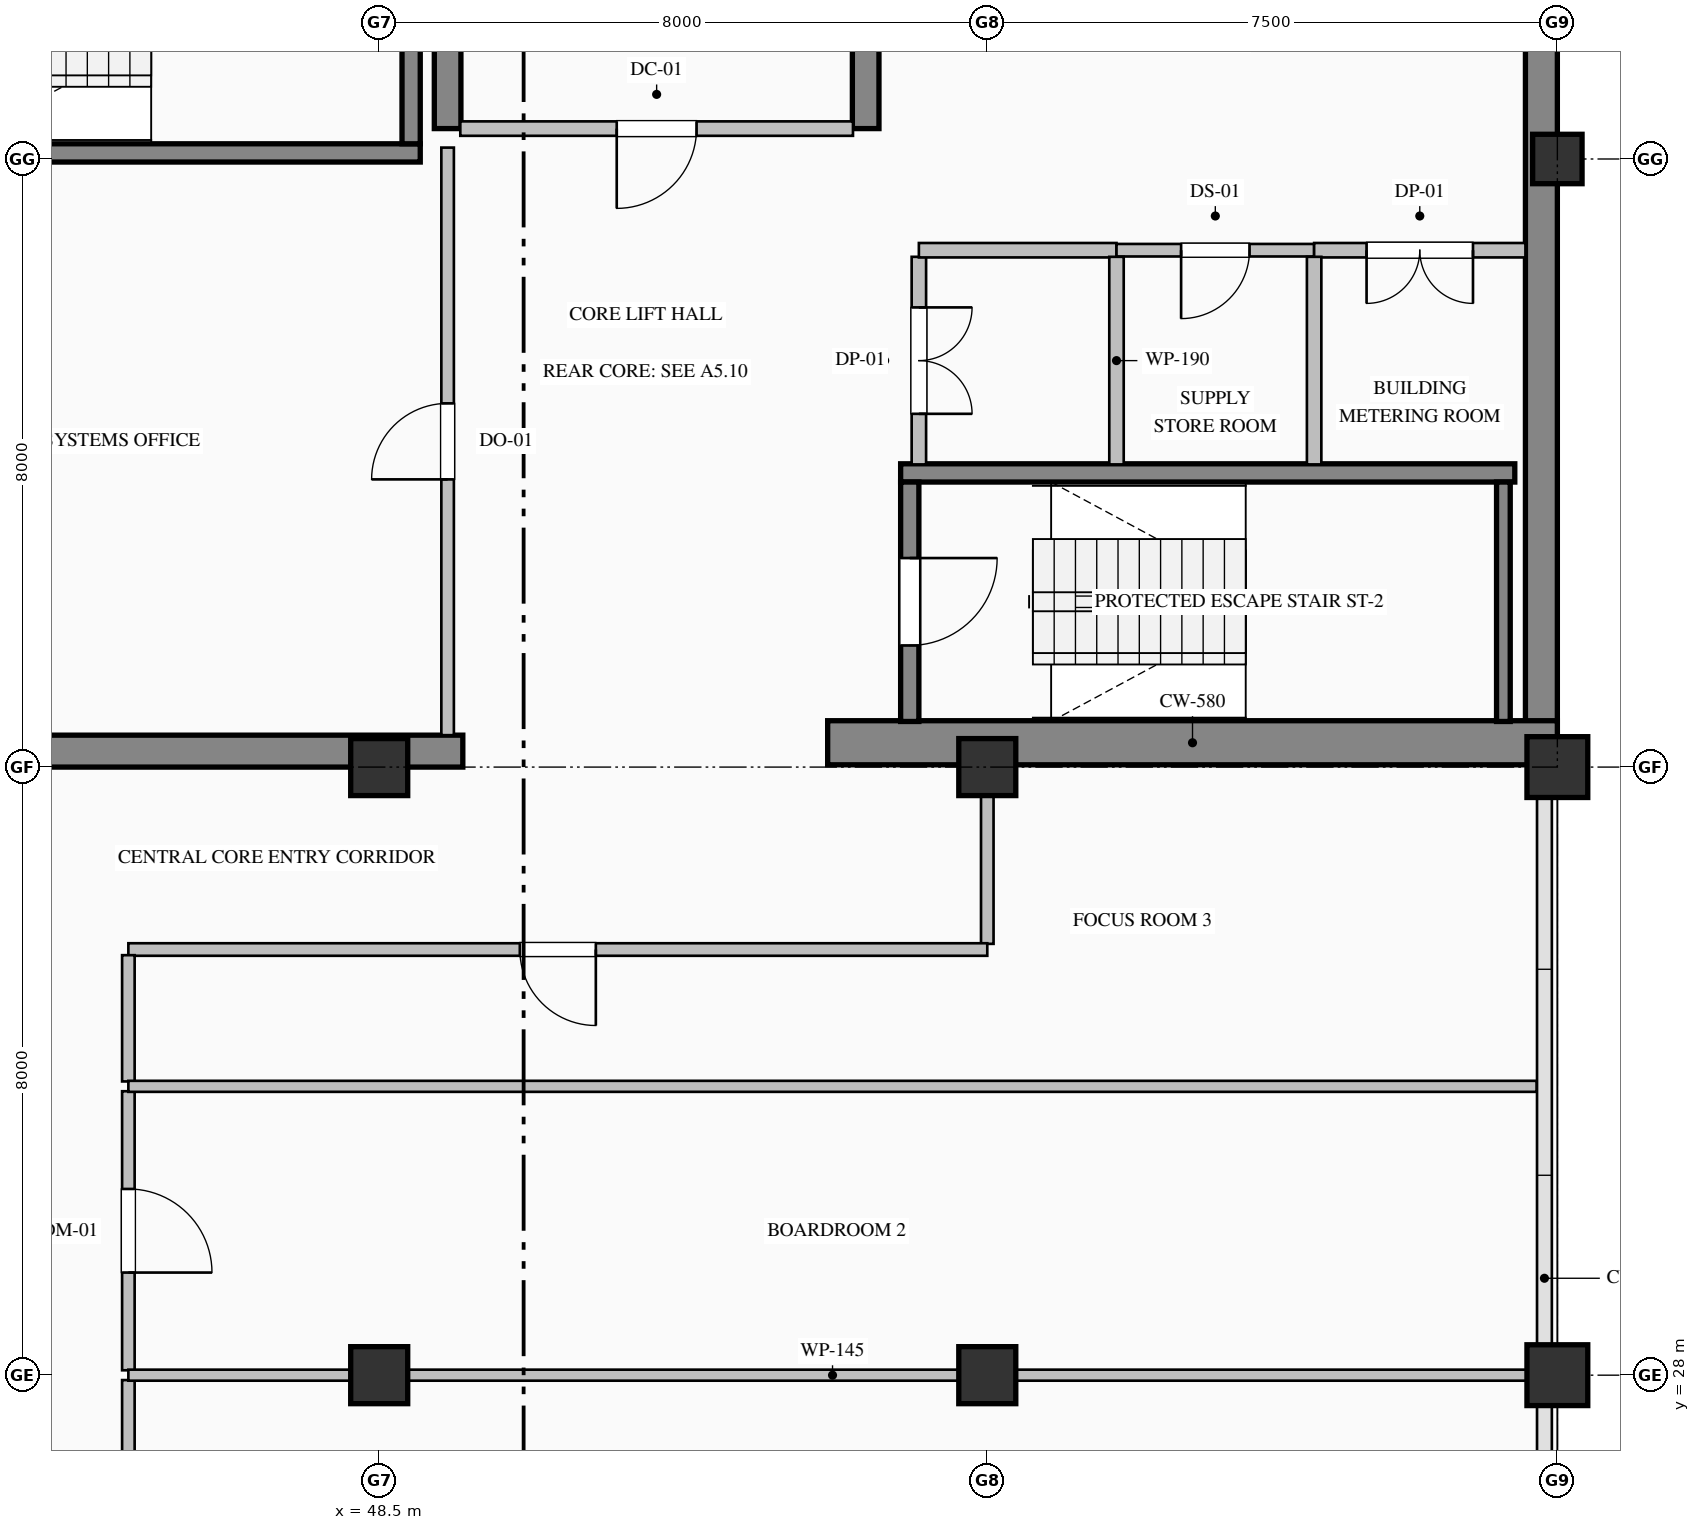
"""IFC4 building model, lengths in metres.
Left out: names, types, materials, properties, quantities, classifications, styles, units other than length and angle.
Written with IfcOpenShell. Run it as: python <this file> out.ifc"""

import sys

from ifc_helpers import new_model, si_unit, direction, frame, frame_2d, origin, origin_2d, place, context, subcontext, project, spatial, rectangle, hollow_rectangle, extrude, element, fill, save


model = new_model("IFC4")
c1 = context("Model", 3, precision=1e-05, world=origin(), true_north=direction((0.0, 1.0)))
c2 = subcontext(c1, "Body", "Model", "MODEL_VIEW")
j1 = project(units=[si_unit("LENGTHUNIT", "METRE"), si_unit("PLANEANGLEUNIT", "RADIAN")], contexts=[c1])
p1 = place(None, origin())
s1 = spatial("IfcSite", under=j1, at=p1, CompositionType="ELEMENT")
p2 = place(p1, origin())
s2 = spatial("IfcBuilding", under=s1, at=p2, CompositionType="ELEMENT")
p3 = place(p2, frame((0.0, 0.0, 291.2)))
s3 = spatial("IfcBuildingStorey", under=s2, at=p3, CompositionType="ELEMENT", Elevation=291.2)
p4 = place(p3, frame((63.79, 36.32, 0.0), z_axis=(0.0, 0.0, 1.0), x_axis=(0.0, 1.0, 0.0)))
e1 = element("IfcWall", 1, at=p4, inside=s3, PredefinedType="SHEAR", context=c2, shape_type="SweptSolid", body=[
    extrude(rectangle(XDim=15.26, YDim=0.42, at=frame_2d((7.63, 0.0))), origin(), (0.0, 0.0, 1.0), 3.785),
])
p5 = place(p3, frame((40.5, 36.21, 0.0), z_axis=(0.0, 0.0, 1.0), x_axis=(1.0, 0.0, 0.0)))
e2 = element("IfcWall", 2, at=p5, inside=s3, PredefinedType="SHEAR", context=c2, shape_type="SweptSolid", body=[
    extrude(rectangle(XDim=9.1, YDim=0.42, at=frame_2d((4.55, 0.0))), origin(), (0.0, 0.0, 1.0), 3.785),
])
p6 = place(p3, frame((54.4, 36.32, 0.0), z_axis=(0.0, 0.0, 1.0), x_axis=(1.0, 0.0, 0.0)))
e3 = element("IfcWall", 3, at=p6, inside=s3, PredefinedType="SHEAR", context=c2, shape_type="SweptSolid", body=[
    extrude(rectangle(XDim=9.6, YDim=0.58, at=frame_2d((4.8, 0.0))), origin(), (0.0, 0.0, 1.0), 4.0),
])
p7 = place(p3, frame((49.4, 44.4, 0.0), z_axis=(0.0, 0.0, 1.0), x_axis=(0.0, 1.0, 0.0)))
e4 = element("IfcWall", 4, at=p7, inside=s3, PredefinedType="SHEAR", context=c2, shape_type="SweptSolid", body=[
    extrude(rectangle(XDim=3.0, YDim=0.35, at=frame_2d((1.5, 0.0))), origin(), (0.0, 0.0, 1.0), 3.785),
])
p8 = place(p3, frame((54.9, 44.4, 0.0), z_axis=(0.0, 0.0, 1.0), x_axis=(0.0, 1.0, 0.0)))
e5 = element("IfcWall", 5, at=p8, inside=s3, PredefinedType="SHEAR", context=c2, shape_type="SweptSolid", body=[
    extrude(rectangle(XDim=7.18, YDim=0.35, at=frame_2d((3.59, 0.0))), origin(), (0.0, 0.0, 1.0), 3.785),
])
for number, where, z_axis, x_axis in (
    (6, (48.5, 28.0, 0.0), (0.0, 0.0, 1.0), (1.0, 0.0, 0.0)),
    (7, (48.5, 36.0, 0.0), (0.0, 0.0, 1.0), (1.0, 0.0, 0.0)),
    (8, (56.5, 28.0, 0.0), (0.0, 0.0, 1.0), (1.0, 0.0, 0.0)),
    (9, (56.5, 36.0, 0.0), (0.0, 0.0, 1.0), (1.0, 0.0, 0.0)),
):
    element("IfcColumn", number, at=place(p3, frame(where, z_axis=z_axis, x_axis=x_axis)), inside=s3, PredefinedType="COLUMN", context=c2, shape_type="SweptSolid", body=[
        extrude(rectangle(XDim=0.75, YDim=0.75, at=origin_2d()), origin(), (0.0, 0.0, 1.0), 4.0),
    ])
for number, where, z_axis, x_axis in (
    (10, (64.0, 28.0, 0.0), (0.0, 0.0, 1.0), (1.0, 0.0, 0.0)),
    (11, (64.0, 36.0, 0.0), (0.0, 0.0, 1.0), (1.0, 0.0, 0.0)),
):
    element("IfcColumn", number, at=place(p3, frame(where, z_axis=z_axis, x_axis=x_axis)), inside=s3, PredefinedType="COLUMN", context=c2, shape_type="SweptSolid", body=[
        extrude(hollow_rectangle(XDim=0.8, YDim=0.8, WallThickness=0.032, at=origin_2d()), origin(), (0.0, 0.0, 1.0), 4.0),
    ])
p9 = place(p3, frame((64.0, 44.0, 0.0), z_axis=(0.0, 0.0, 1.0), x_axis=(1.0, 0.0, 0.0)))
e12 = element("IfcColumn", 12, at=p9, inside=s3, PredefinedType="COLUMN", context=c2, shape_type="SweptSolid", body=[
    extrude(hollow_rectangle(XDim=0.65, YDim=0.65, WallThickness=0.028, at=origin_2d()), origin(), (0.0, 0.0, 1.0), 4.0),
])
p10 = place(p3, frame((49.04, 44.08, 0.0), z_axis=(0.0, 0.0, 1.0), x_axis=(-1.0, 0.0, 0.0)))
e13 = element("IfcWall", 13, at=p10, inside=s3, PredefinedType="SOLIDWALL", context=c2, shape_type="SweptSolid", body=[
    extrude(rectangle(XDim=8.08, YDim=0.24, at=frame_2d((4.04, 0.0))), origin(), (0.0, 0.0, 1.0), 4.0),
])
p11 = place(p3, frame((48.92, 44.2, 0.0), z_axis=(0.0, 0.0, 1.0), x_axis=(0.0, 1.0, 0.0)))
e14 = element("IfcWall", 14, at=p11, inside=s3, PredefinedType="SOLIDWALL", context=c2, shape_type="SweptSolid", body=[
    extrude(rectangle(XDim=3.15, YDim=0.24, at=frame_2d((1.575, 0.0))), origin(), (0.0, 0.0, 1.0), 4.0),
])
p12 = place(p3, frame((55.36, 39.87, 0.0), z_axis=(0.0, 0.0, 1.0), x_axis=(1.0, 0.0, 0.0)))
e15 = element("IfcWall", 15, at=p12, inside=s3, PredefinedType="SOLIDWALL", context=c2, shape_type="SweptSolid", body=[
    extrude(rectangle(XDim=8.08, YDim=0.24, at=frame_2d((4.04, 0.0))), origin(), (0.0, 0.0, 1.0), 4.0),
])
p13 = place(p3, frame((55.48, 39.75, 0.0), z_axis=(0.0, 0.0, 1.0), x_axis=(0.0, -1.0, 0.0)))
e16 = element("IfcWall", 16, at=p13, inside=s3, PredefinedType="SOLIDWALL", context=c2, shape_type="SweptSolid", body=[
    extrude(rectangle(XDim=3.15, YDim=0.24, at=frame_2d((1.575, 0.0))), origin(), (0.0, 0.0, 1.0), 4.0),
])
p14 = place(p13, frame((1.0, 0.0, 0.0)))
e17 = element("IfcOpeningElement", 17, at=p14, cuts=e16, PredefinedType="OPENING", context=c2, shape_type="SweptSolid", body=[
    extrude(rectangle(XDim=1.15, YDim=2.2, at=frame_2d((0.575, 1.1))), frame((0.0, 0.13, 0.0), z_axis=(0.0, -1.0, 0.0), x_axis=(1.0, 0.0, 0.0)), (0.0, 0.0, 1.0), 0.26),
])
p15 = place(p3, frame((63.29, 36.6, 0.0), z_axis=(0.0, 0.0, 1.0), x_axis=(0.0, 1.0, 0.0)))
e18 = element("IfcWall", 18, at=p15, inside=s3, PredefinedType="SOLIDWALL", context=c2, shape_type="SweptSolid", body=[
    extrude(rectangle(XDim=3.15, YDim=0.18, at=frame_2d((1.575, 0.0))), origin(), (0.0, 0.0, 1.0), 4.0),
])
p16 = place(p3, frame((54.733, 44.4, 0.0), z_axis=(0.0, 0.0, 1.0), x_axis=(-1.0, 0.0, 0.0)))
e19 = element("IfcWall", 19, at=p16, inside=s3, PredefinedType="PARTITIONING", context=c2, shape_type="SweptSolid", body=[
    extrude(rectangle(XDim=5.166, YDim=0.19, at=frame_2d((2.583, 0.0))), origin(), (0.0, 0.0, 1.0), 3.785),
])
p17 = place(p16, frame((2.058, 0.0, 0.0)))
e20 = element("IfcOpeningElement", 20, at=p17, cuts=e19, PredefinedType="OPENING", context=c2, shape_type="SweptSolid", body=[
    extrude(rectangle(XDim=1.05, YDim=2.15, at=frame_2d((0.525, 1.075))), frame((0.0, 0.105, 0.0), z_axis=(0.0, -1.0, 0.0), x_axis=(1.0, 0.0, 0.0)), (0.0, 0.0, 1.0), 0.21),
])
p18 = place(p3, frame((49.4, 36.42, 0.0), z_axis=(0.0, 0.0, 1.0), x_axis=(0.0, 1.0, 0.0)))
e21 = element("IfcWall", 21, at=p18, inside=s3, PredefinedType="PARTITIONING", context=c2, shape_type="SweptSolid", body=[
    extrude(rectangle(XDim=7.73, YDim=0.165, at=frame_2d((3.865, 0.0))), origin(), (0.0, 0.0, 1.0), 3.027),
])
p19 = place(p18, frame((3.365, 0.0, 0.0)))
e22 = element("IfcOpeningElement", 22, at=p19, cuts=e21, PredefinedType="OPENING", context=c2, shape_type="SweptSolid", body=[
    extrude(rectangle(XDim=1.0, YDim=2.15, at=frame_2d((0.5, 1.075))), frame((0.0, 0.093, 0.0), z_axis=(0.0, -1.0, 0.0), x_axis=(1.0, 0.0, 0.0)), (0.0, 0.0, 1.0), 0.185),
])
p20 = place(p3, frame((55.6, 42.713, 0.0), z_axis=(0.0, 0.0, 1.0), x_axis=(0.0, -1.0, 0.0)))
e23 = element("IfcWall", 23, at=p20, inside=s3, PredefinedType="PARTITIONING", context=c2, shape_type="SweptSolid", body=[
    extrude(rectangle(XDim=2.731, YDim=0.19, at=frame_2d((1.365, 0.0))), origin(), (0.0, 0.0, 1.0), 3.785),
])
p21 = place(p20, frame((0.666, 0.0, 0.0)))
e24 = element("IfcOpeningElement", 24, at=p21, cuts=e23, PredefinedType="OPENING", context=c2, shape_type="SweptSolid", body=[
    extrude(rectangle(XDim=1.4, YDim=2.25, at=frame_2d((0.7, 1.125))), frame((0.0, 0.105, 0.0), z_axis=(0.0, -1.0, 0.0), x_axis=(1.0, 0.0, 0.0)), (0.0, 0.0, 1.0), 0.21),
])
p22 = place(p3, frame((58.2, 42.8, 0.0), z_axis=(0.0, 0.0, 1.0), x_axis=(-1.0, 0.0, 0.0)))
e25 = element("IfcWall", 25, at=p22, inside=s3, PredefinedType="PARTITIONING", context=c2, shape_type="SweptSolid", body=[
    extrude(rectangle(XDim=2.6, YDim=0.19, at=frame_2d((1.3, 0.0))), origin(), (0.0, 0.0, 1.0), 3.785),
])
p23 = place(p3, frame((60.8, 42.8, 0.0), z_axis=(0.0, 0.0, 1.0), x_axis=(-1.0, 0.0, 0.0)))
e26 = element("IfcWall", 26, at=p23, inside=s3, PredefinedType="PARTITIONING", context=c2, shape_type="SweptSolid", body=[
    extrude(rectangle(XDim=2.6, YDim=0.165, at=frame_2d((1.3, 0.0))), origin(), (0.0, 0.0, 1.0), 3.785),
])
p24 = place(p23, frame((0.85, 0.0, 0.0)))
e27 = element("IfcOpeningElement", 27, at=p24, cuts=e26, PredefinedType="OPENING", context=c2, shape_type="SweptSolid", body=[
    extrude(rectangle(XDim=0.9, YDim=2.15, at=frame_2d((0.45, 1.075))), frame((0.0, 0.093, 0.0), z_axis=(0.0, -1.0, 0.0), x_axis=(1.0, 0.0, 0.0)), (0.0, 0.0, 1.0), 0.185),
])
p25 = place(p3, frame((63.58, 42.8, 0.0), z_axis=(0.0, 0.0, 1.0), x_axis=(-1.0, 0.0, 0.0)))
e28 = element("IfcWall", 28, at=p25, inside=s3, PredefinedType="PARTITIONING", context=c2, shape_type="SweptSolid", body=[
    extrude(rectangle(XDim=2.78, YDim=0.19, at=frame_2d((1.39, 0.0))), origin(), (0.0, 0.0, 1.0), 3.785),
])
p26 = place(p25, frame((0.69, 0.0, 0.0)))
e29 = element("IfcOpeningElement", 29, at=p26, cuts=e28, PredefinedType="OPENING", context=c2, shape_type="SweptSolid", body=[
    extrude(rectangle(XDim=1.4, YDim=2.25, at=frame_2d((0.7, 1.125))), frame((0.0, 0.105, 0.0), z_axis=(0.0, -1.0, 0.0), x_axis=(1.0, 0.0, 0.0)), (0.0, 0.0, 1.0), 0.21),
])
for number, where, z_axis, x_axis in (
    (30, (58.2, 42.713, 0.0), (0.0, 0.0, 1.0), (0.0, -1.0, 0.0)),
    (31, (60.8, 42.713, 0.0), (0.0, 0.0, 1.0), (0.0, -1.0, 0.0)),
):
    element("IfcWall", number, at=place(p3, frame(where, z_axis=z_axis, x_axis=x_axis)), inside=s3, PredefinedType="PARTITIONING", context=c2, shape_type="SweptSolid", body=[
        extrude(rectangle(XDim=2.731, YDim=0.19, at=frame_2d((1.365, 0.0))), origin(), (0.0, 0.0, 1.0), 3.785),
    ])
p27 = place(p3, frame((56.5, 36.0, 0.0), z_axis=(0.0, 0.0, 1.0), x_axis=(0.0, -1.0, 0.0)))
e32 = element("IfcWall", 32, at=p27, inside=s3, PredefinedType="PARTITIONING", context=c2, shape_type="SweptSolid", body=[
    extrude(rectangle(XDim=2.325, YDim=0.165, at=frame_2d((1.163, 0.0))), origin(), (0.0, 0.0, 1.0), 3.177),
])
p28 = place(p3, frame((56.5, 33.6, 0.0), z_axis=(0.0, 0.0, 1.0), x_axis=(-1.0, 0.0, 0.0)))
e33 = element("IfcWall", 33, at=p28, inside=s3, PredefinedType="PARTITIONING", context=c2, shape_type="SweptSolid", body=[
    extrude(rectangle(XDim=11.3, YDim=0.165, at=frame_2d((5.65, 0.0))), origin(), (0.0, 0.0, 1.0), 3.785),
])
p29 = place(p28, frame((5.15, 0.0, 0.0)))
e34 = element("IfcOpeningElement", 34, at=p29, cuts=e33, PredefinedType="OPENING", context=c2, shape_type="SweptSolid", body=[
    extrude(rectangle(XDim=1.0, YDim=2.15, at=frame_2d((0.5, 1.075))), frame((0.0, 0.093, 0.0), z_axis=(0.0, -1.0, 0.0), x_axis=(1.0, 0.0, 0.0)), (0.0, 0.0, 1.0), 0.185),
])
p30 = place(p3, frame((45.2, 27.936, 0.0), z_axis=(0.0, 0.0, 1.0), x_axis=(0.0, -1.0, 0.0)))
e35 = element("IfcWall", 35, at=p30, inside=s3, PredefinedType="PARTITIONING", context=c2, shape_type="SweptSolid", body=[
    extrude(rectangle(XDim=2.861, YDim=0.165, at=frame_2d((1.431, 0.0))), origin(), (0.0, 0.0, 1.0), 3.785),
])
p31 = place(p3, frame((45.2, 31.736, 0.0), z_axis=(0.0, 0.0, 1.0), x_axis=(0.0, -1.0, 0.0)))
e36 = element("IfcWall", 36, at=p31, inside=s3, PredefinedType="PARTITIONING", context=c2, shape_type="SweptSolid", body=[
    extrude(rectangle(XDim=3.671, YDim=0.165, at=frame_2d((1.835, 0.0))), origin(), (0.0, 0.0, 1.0), 3.785),
])
p32 = place(p31, frame((1.285, 0.0, 0.0)))
e37 = element("IfcOpeningElement", 37, at=p32, cuts=e36, PredefinedType="OPENING", context=c2, shape_type="SweptSolid", body=[
    extrude(rectangle(XDim=1.1, YDim=2.2, at=frame_2d((0.55, 1.1))), frame((0.0, 0.093, 0.0), z_axis=(0.0, -1.0, 0.0), x_axis=(1.0, 0.0, 0.0)), (0.0, 0.0, 1.0), 0.185),
])
p33 = place(p3, frame((45.2, 33.525, 0.0), z_axis=(0.0, 0.0, 1.0), x_axis=(0.0, -1.0, 0.0)))
e38 = element("IfcWall", 38, at=p33, inside=s3, PredefinedType="PARTITIONING", context=c2, shape_type="SweptSolid", body=[
    extrude(rectangle(XDim=1.661, YDim=0.165, at=frame_2d((0.831, 0.0))), origin(), (0.0, 0.0, 1.0), 3.785),
])
p34 = place(p3, frame((45.2, 28.0, 0.0), z_axis=(0.0, 0.0, 1.0), x_axis=(1.0, 0.0, 0.0)))
e39 = element("IfcWall", 39, at=p34, inside=s3, PredefinedType="PARTITIONING", context=c2, shape_type="SweptSolid", body=[
    extrude(rectangle(XDim=18.528, YDim=0.145, at=frame_2d((9.264, 0.0))), origin(), (0.0, 0.0, 1.0), 3.177),
])
p35 = place(p3, frame((45.2, 31.8, 0.0), z_axis=(0.0, 0.0, 1.0), x_axis=(1.0, 0.0, 0.0)))
e40 = element("IfcWall", 40, at=p35, inside=s3, PredefinedType="PARTITIONING", context=c2, shape_type="SweptSolid", body=[
    extrude(rectangle(XDim=18.528, YDim=0.145, at=frame_2d((9.264, 0.0))), origin(), (0.0, 0.0, 1.0), 3.785),
])
p36 = place(p14, origin())
e41 = element("IfcDoor", 41, at=p36, inside=s3, OperationType="SINGLE_SWING_LEFT", PredefinedType="DOOR", context=c2, shape_type="SweptSolid", body=[
    extrude(rectangle(XDim=1.15, YDim=2.2, at=frame_2d((0.575, 1.1))), frame((0.0, 0.025, 0.0), z_axis=(0.0, -1.0, 0.0), x_axis=(1.0, 0.0, 0.0)), (0.0, 0.0, 1.0), 0.05),
])
fill(e17, e41)
p37 = place(p17, origin())
e42 = element("IfcDoor", 42, at=p37, inside=s3, OperationType="SINGLE_SWING_RIGHT", PredefinedType="DOOR", context=c2, shape_type="SweptSolid", body=[
    extrude(rectangle(XDim=1.05, YDim=2.15, at=frame_2d((0.525, 1.075))), frame((0.0, 0.025, 0.0), z_axis=(0.0, -1.0, 0.0), x_axis=(1.0, 0.0, 0.0)), (0.0, 0.0, 1.0), 0.05),
])
fill(e20, e42)
p38 = place(p19, origin())
e43 = element("IfcDoor", 43, at=p38, inside=s3, OperationType="SINGLE_SWING_LEFT", PredefinedType="DOOR", context=c2, shape_type="SweptSolid", body=[
    extrude(rectangle(XDim=1.0, YDim=2.15, at=frame_2d((0.5, 1.075))), frame((0.0, 0.025, 0.0), z_axis=(0.0, -1.0, 0.0), x_axis=(1.0, 0.0, 0.0)), (0.0, 0.0, 1.0), 0.05),
])
fill(e22, e43)
p39 = place(p21, origin())
e44 = element("IfcDoor", 44, at=p39, inside=s3, OperationType="DOUBLE_DOOR_SINGLE_SWING", PredefinedType="DOOR", context=c2, shape_type="SweptSolid", body=[
    extrude(rectangle(XDim=1.4, YDim=2.25, at=frame_2d((0.7, 1.125))), frame((0.0, 0.025, 0.0), z_axis=(0.0, -1.0, 0.0), x_axis=(1.0, 0.0, 0.0)), (0.0, 0.0, 1.0), 0.05),
])
fill(e24, e44)
p40 = place(p24, origin())
e45 = element("IfcDoor", 45, at=p40, inside=s3, OperationType="SINGLE_SWING_RIGHT", PredefinedType="DOOR", context=c2, shape_type="SweptSolid", body=[
    extrude(rectangle(XDim=0.9, YDim=2.15, at=frame_2d((0.45, 1.075))), frame((0.0, 0.025, 0.0), z_axis=(0.0, -1.0, 0.0), x_axis=(1.0, 0.0, 0.0)), (0.0, 0.0, 1.0), 0.05),
])
fill(e27, e45)
p41 = place(p26, origin())
e46 = element("IfcDoor", 46, at=p41, inside=s3, OperationType="DOUBLE_DOOR_SINGLE_SWING", PredefinedType="DOOR", context=c2, shape_type="SweptSolid", body=[
    extrude(rectangle(XDim=1.4, YDim=2.25, at=frame_2d((0.7, 1.125))), frame((0.0, 0.025, 0.0), z_axis=(0.0, -1.0, 0.0), x_axis=(1.0, 0.0, 0.0)), (0.0, 0.0, 1.0), 0.05),
])
fill(e29, e46)
p42 = place(p32, origin())
e47 = element("IfcDoor", 47, at=p42, inside=s3, OperationType="SINGLE_SWING_RIGHT", PredefinedType="DOOR", context=c2, shape_type="SweptSolid", body=[
    extrude(rectangle(XDim=1.1, YDim=2.2, at=frame_2d((0.55, 1.1))), frame((0.0, 0.025, 0.0), z_axis=(0.0, -1.0, 0.0), x_axis=(1.0, 0.0, 0.0)), (0.0, 0.0, 1.0), 0.05),
])
fill(e37, e47)
p43 = place(p29, origin())
e48 = element("IfcDoor", 48, at=p43, inside=s3, OperationType="SINGLE_SWING_LEFT", PredefinedType="DOOR", context=c2, shape_type="SweptSolid", body=[
    extrude(rectangle(XDim=1.0, YDim=2.15, at=frame_2d((0.5, 1.075))), frame((0.0, 0.025, 0.0), z_axis=(0.0, -1.0, 0.0), x_axis=(1.0, 0.0, 0.0)), (0.0, 0.0, 1.0), 0.05),
])
fill(e34, e48)
save(model, sys.argv[1])
